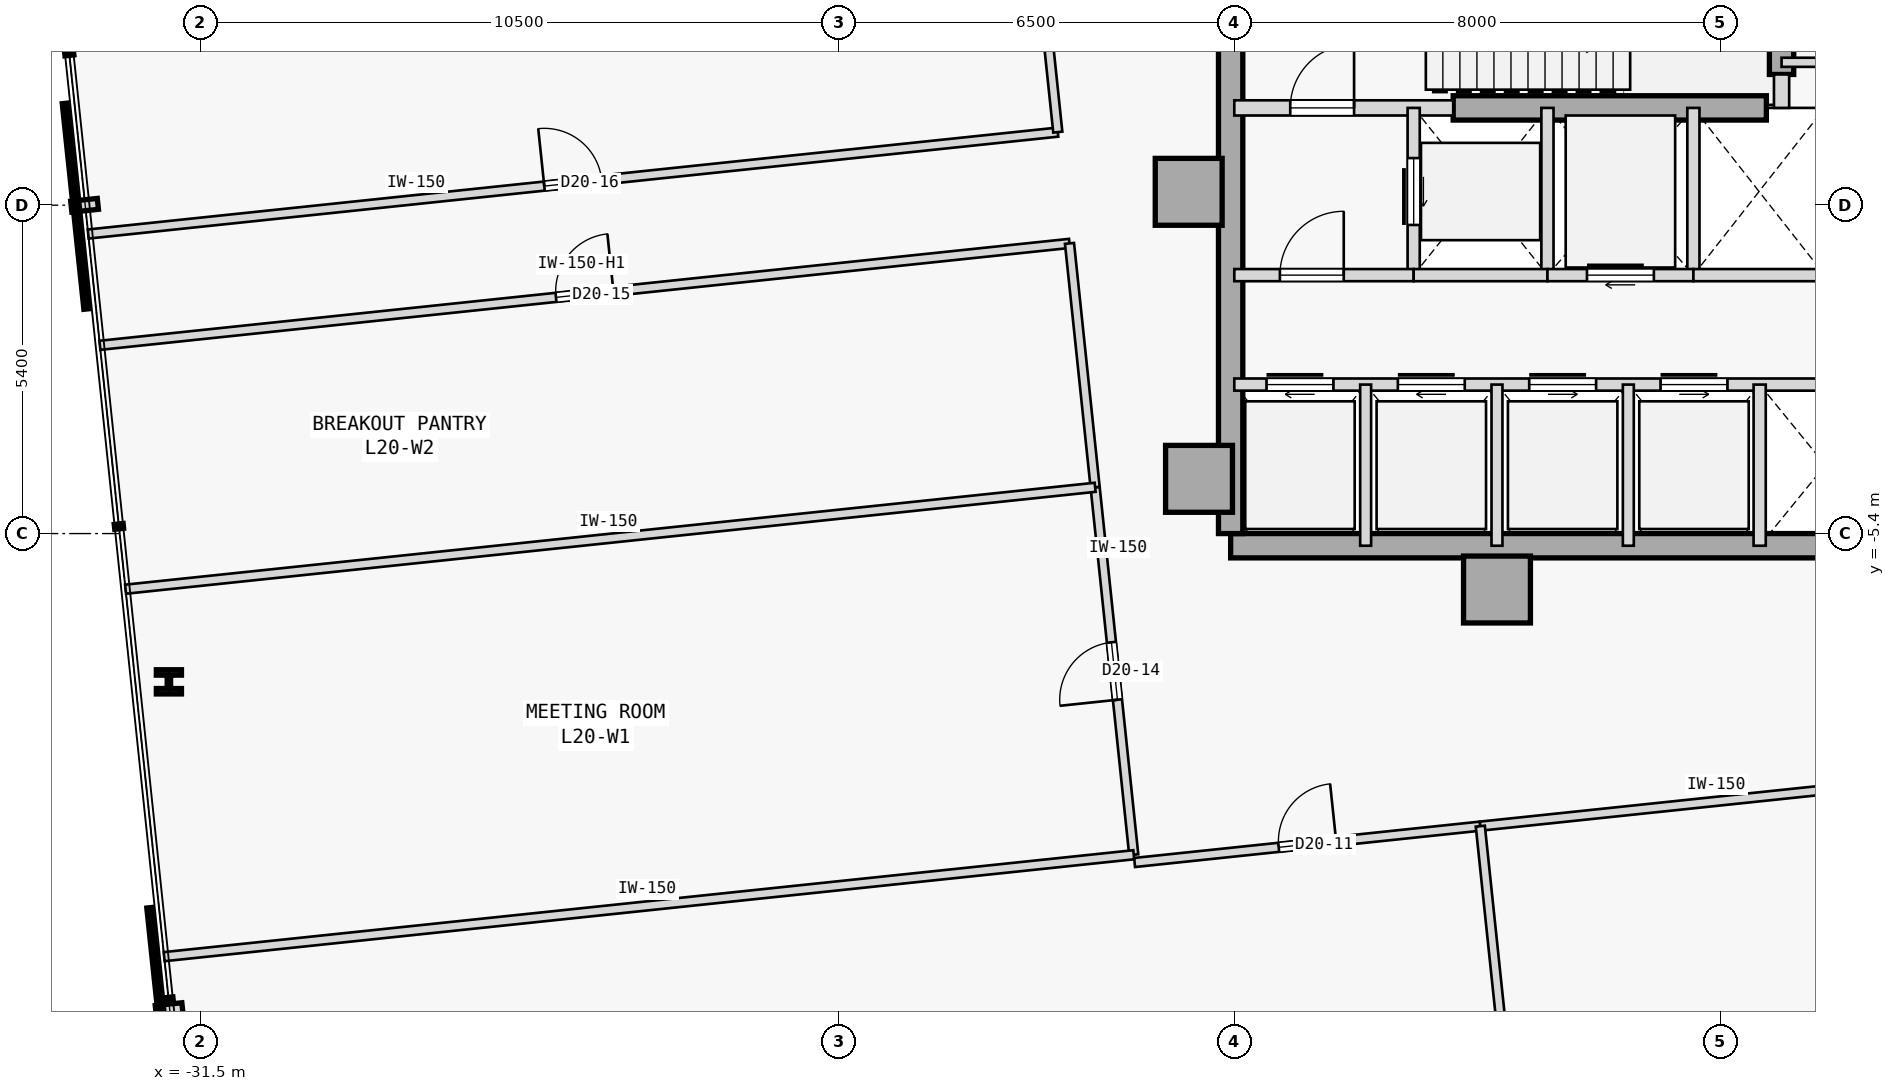
"""IFC4 building model, lengths in metres.
Left out: names, types, materials, properties, quantities, classifications, styles, units other than length and angle.
Written with IfcOpenShell. Run it as: python <this file> out.ifc"""

import sys

from ifc_helpers import new_model, si_unit, direction, frame, frame_2d, origin, origin_2d, place, context, subcontext, project, spatial, rectangle, i_section, extrude, element, fill, save


model = new_model("IFC4")
c1 = context("Model", 3, precision=1e-05, world=origin(), true_north=direction((0.0, 1.0)))
c2 = subcontext(c1, "Body", "Model", "MODEL_VIEW")
j1 = project(units=[si_unit("LENGTHUNIT", "METRE"), si_unit("PLANEANGLEUNIT", "RADIAN")], contexts=[c1])
p1 = place(None, origin())
s1 = spatial("IfcSite", under=j1, at=p1, CompositionType="ELEMENT")
p2 = place(p1, origin())
s2 = spatial("IfcBuilding", under=s1, at=p2, CompositionType="ELEMENT")
p3 = place(p2, frame((0.0, 0.0, 83.2)))
s3 = spatial("IfcBuildingStorey", under=s2, at=p3, CompositionType="ELEMENT", Elevation=83.2)
for number, where, z_axis, x_axis in (
    (1, (-15.25, 0.22, 0.0), (0.0, 0.0, 1.0), (1.0, 0.0, 0.0)),
    (2, (-15.08, -4.5, 0.0), (0.0, 0.0, 1.0), (1.0, 0.0, 0.0)),
    (3, (-10.18, -6.32, 0.0), (0.0, 0.0, 1.0), (1.0, 0.0, 0.0)),
):
    element("IfcColumn", number, at=place(p3, frame(where, z_axis=z_axis, x_axis=x_axis)), inside=s3, PredefinedType="COLUMN", context=c2, shape_type="SweptSolid", body=[
        extrude(rectangle(XDim=1.1, YDim=1.1, at=origin_2d()), origin(), (0.0, 0.0, 1.0), 4.2),
    ])
p4 = place(p3, frame((-14.56, -5.6, 0.0), z_axis=(0.0, 0.0, 1.0), x_axis=(1.0, 0.0, 0.0)))
e4 = element("IfcWall", 4, at=p4, inside=s3, PredefinedType="SHEAR", context=c2, shape_type="SweptSolid", body=[
    extrude(rectangle(XDim=10.86, YDim=0.4, at=frame_2d((5.43, 0.0))), origin(), (0.0, 0.0, 1.0), 3.975),
])
p5 = place(p3, frame((-14.56, -5.4, 0.0), z_axis=(0.0, 0.0, 1.0), x_axis=(0.0, 1.0, 0.0)))
e5 = element("IfcWall", 5, at=p5, inside=s3, PredefinedType="SHEAR", context=c2, shape_type="SweptSolid", body=[
    extrude(rectangle(XDim=10.8, YDim=0.4, at=frame_2d((5.4, 0.0))), origin(), (0.0, 0.0, 1.0), 3.975),
])
p6 = place(p3, frame((-5.5, 2.15, 0.0), z_axis=(0.0, 0.0, 1.0), x_axis=(0.0, 1.0, 0.0)))
e6 = element("IfcWall", 6, at=p6, inside=s3, PredefinedType="SHEAR", context=c2, shape_type="SweptSolid", body=[
    extrude(rectangle(XDim=3.25, YDim=0.4, at=frame_2d((1.625, 0.0))), origin(), (0.0, 0.0, 1.0), 3.975),
])
p7 = place(p3, frame((-10.9, 1.6, 0.0), z_axis=(0.0, 0.0, 1.0), x_axis=(1.0, 0.0, 0.0)))
e7 = element("IfcWall", 7, at=p7, inside=s3, PredefinedType="SHEAR", context=c2, shape_type="SweptSolid", body=[
    extrude(rectangle(XDim=5.15, YDim=0.4, at=frame_2d((2.575, 0.0))), origin(), (0.0, 0.0, 1.0), 3.975),
])
p8 = place(p3, frame((-32.021, -7.838, 0.0), z_axis=(0.0, 0.0, 1.0), x_axis=(1.0, 0.0, 0.0)))
e8 = element("IfcColumn", 8, at=p8, inside=s3, PredefinedType="COLUMN", context=c2, shape_type="SweptSolid", body=[
    extrude(i_section(OverallWidth=0.413, OverallDepth=0.398, WebThickness=0.056, FlangeThickness=0.089, FilletRadius=0.015, at=origin_2d()), origin(), (0.0, 0.0, 1.0), 4.2),
])
p9 = place(p3, frame((-14.5, 1.6, 0.0), z_axis=(0.0, 0.0, 1.0), x_axis=(1.0, 0.0, 0.0)))
e9 = element("IfcWall", 9, at=p9, inside=s3, PredefinedType="STANDARD", context=c2, shape_type="SweptSolid", body=[
    extrude(rectangle(XDim=3.6, YDim=0.25, at=frame_2d((1.8, 0.0))), origin(), (0.0, 0.0, 1.0), 3.975),
])
p10 = place(p9, frame((0.92, 0.0, 0.0)))
e10 = element("IfcOpeningElement", 10, at=p10, cuts=e9, PredefinedType="OPENING", context=c2, shape_type="SweptSolid", body=[
    extrude(rectangle(XDim=1.05, YDim=2.15, at=frame_2d((0.525, 1.075))), frame((0.0, 0.135, 0.0), z_axis=(0.0, -1.0, 0.0), x_axis=(1.0, 0.0, 0.0)), (0.0, 0.0, 1.0), 0.27),
])
p11 = place(p3, frame((-5.5, 1.6, 0.0), z_axis=(0.0, 0.0, 1.0), x_axis=(0.0, 1.0, 0.0)))
e11 = element("IfcWall", 11, at=p11, inside=s3, PredefinedType="STANDARD", context=c2, shape_type="SweptSolid", body=[
    extrude(rectangle(XDim=0.55, YDim=0.25, at=frame_2d((0.275, 0.0))), origin(), (0.0, 0.0, 1.0), 3.975),
])
p12 = place(p3, frame((-11.55, -1.15, 0.0), z_axis=(0.0, 0.0, 1.0), x_axis=(0.0, 1.0, 0.0)))
e12 = element("IfcWall", 12, at=p12, inside=s3, PredefinedType="STANDARD", context=c2, shape_type="SweptSolid", body=[
    extrude(rectangle(XDim=2.75, YDim=0.2, at=frame_2d((1.375, 0.0))), origin(), (0.0, 0.0, 1.0), 3.975),
])
p13 = place(p12, frame((0.825, 0.0, 0.0)))
e13 = element("IfcOpeningElement", 13, at=p13, cuts=e12, PredefinedType="OPENING", context=c2, shape_type="SweptSolid", body=[
    extrude(rectangle(XDim=1.1, YDim=2.15, at=frame_2d((0.55, 1.075))), frame((0.0, 0.11, 0.0), z_axis=(0.0, -1.0, 0.0), x_axis=(1.0, 0.0, 0.0)), (0.0, 0.0, 1.0), 0.22),
])
p14 = place(p3, frame((-9.35, -1.15, 0.0), z_axis=(0.0, 0.0, 1.0), x_axis=(0.0, 1.0, 0.0)))
e14 = element("IfcWall", 14, at=p14, inside=s3, PredefinedType="STANDARD", context=c2, shape_type="SweptSolid", body=[
    extrude(rectangle(XDim=2.75, YDim=0.2, at=frame_2d((1.375, 0.0))), origin(), (0.0, 0.0, 1.0), 3.975),
])
p15 = place(p3, frame((-14.5, -1.15, 0.0), z_axis=(0.0, 0.0, 1.0), x_axis=(1.0, 0.0, 0.0)))
e15 = element("IfcWall", 15, at=p15, inside=s3, PredefinedType="STANDARD", context=c2, shape_type="SweptSolid", body=[
    extrude(rectangle(XDim=2.95, YDim=0.2, at=frame_2d((1.475, 0.0))), origin(), (0.0, 0.0, 1.0), 3.975),
])
p16 = place(p15, frame((0.75, 0.0, 0.0)))
e16 = element("IfcOpeningElement", 16, at=p16, cuts=e15, PredefinedType="OPENING", context=c2, shape_type="SweptSolid", body=[
    extrude(rectangle(XDim=1.05, YDim=2.18, at=frame_2d((0.525, 1.09))), frame((0.0, 0.11, 0.0), z_axis=(0.0, -1.0, 0.0), x_axis=(1.0, 0.0, 0.0)), (0.0, 0.0, 1.0), 0.22),
])
p17 = place(p3, frame((-11.55, -1.15, 0.0), z_axis=(0.0, 0.0, 1.0), x_axis=(1.0, 0.0, 0.0)))
e17 = element("IfcWall", 17, at=p17, inside=s3, PredefinedType="STANDARD", context=c2, shape_type="SweptSolid", body=[
    extrude(rectangle(XDim=2.2, YDim=0.2, at=frame_2d((1.1, 0.0))), origin(), (0.0, 0.0, 1.0), 3.975),
])
p18 = place(p3, frame((-6.95, -1.15, 0.0), z_axis=(0.0, 0.0, 1.0), x_axis=(0.0, 1.0, 0.0)))
e18 = element("IfcWall", 18, at=p18, inside=s3, PredefinedType="STANDARD", context=c2, shape_type="SweptSolid", body=[
    extrude(rectangle(XDim=2.75, YDim=0.2, at=frame_2d((1.375, 0.0))), origin(), (0.0, 0.0, 1.0), 3.975),
])
p19 = place(p3, frame((-9.35, -1.15, 0.0), z_axis=(0.0, 0.0, 1.0), x_axis=(1.0, 0.0, 0.0)))
e19 = element("IfcWall", 19, at=p19, inside=s3, PredefinedType="STANDARD", context=c2, shape_type="SweptSolid", body=[
    extrude(rectangle(XDim=2.4, YDim=0.2, at=frame_2d((1.2, 0.0))), origin(), (0.0, 0.0, 1.0), 3.975),
])
p20 = place(p19, frame((0.65, 0.0, 0.0)))
e20 = element("IfcOpeningElement", 20, at=p20, cuts=e19, PredefinedType="OPENING", context=c2, shape_type="SweptSolid", body=[
    extrude(rectangle(XDim=1.1, YDim=2.15, at=frame_2d((0.55, 1.075))), frame((0.0, 0.11, 0.0), z_axis=(0.0, -1.0, 0.0), x_axis=(1.0, 0.0, 0.0)), (0.0, 0.0, 1.0), 0.22),
])
p21 = place(p3, frame((-6.95, -1.15, 0.0), z_axis=(0.0, 0.0, 1.0), x_axis=(1.0, 0.0, 0.0)))
e21 = element("IfcWall", 21, at=p21, inside=s3, PredefinedType="STANDARD", context=c2, shape_type="SweptSolid", body=[
    extrude(rectangle(XDim=2.16, YDim=0.2, at=frame_2d((1.08, 0.0))), origin(), (0.0, 0.0, 1.0), 3.975),
])
p22 = place(p3, frame((-14.5, -2.95, 0.0), z_axis=(0.0, 0.0, 1.0), x_axis=(1.0, 0.0, 0.0)))
e22 = element("IfcWall", 22, at=p22, inside=s3, PredefinedType="STANDARD", context=c2, shape_type="SweptSolid", body=[
    extrude(rectangle(XDim=10.8, YDim=0.2, at=frame_2d((5.4, 0.0))), origin(), (0.0, 0.0, 1.0), 3.975),
])
p23 = place(p22, frame((0.53, 0.0, 0.0)))
e23 = element("IfcOpeningElement", 23, at=p23, cuts=e22, PredefinedType="OPENING", context=c2, shape_type="SweptSolid", body=[
    extrude(rectangle(XDim=1.1, YDim=2.15, at=frame_2d((0.55, 1.075))), frame((0.0, 0.11, 0.0), z_axis=(0.0, -1.0, 0.0), x_axis=(1.0, 0.0, 0.0)), (0.0, 0.0, 1.0), 0.22),
])
p24 = place(p22, frame((2.69, 0.0, 0.0)))
e24 = element("IfcOpeningElement", 24, at=p24, cuts=e22, PredefinedType="OPENING", context=c2, shape_type="SweptSolid", body=[
    extrude(rectangle(XDim=1.1, YDim=2.15, at=frame_2d((0.55, 1.075))), frame((0.0, 0.11, 0.0), z_axis=(0.0, -1.0, 0.0), x_axis=(1.0, 0.0, 0.0)), (0.0, 0.0, 1.0), 0.22),
])
p25 = place(p22, frame((4.85, 0.0, 0.0)))
e25 = element("IfcOpeningElement", 25, at=p25, cuts=e22, PredefinedType="OPENING", context=c2, shape_type="SweptSolid", body=[
    extrude(rectangle(XDim=1.1, YDim=2.15, at=frame_2d((0.55, 1.075))), frame((0.0, 0.11, 0.0), z_axis=(0.0, -1.0, 0.0), x_axis=(1.0, 0.0, 0.0)), (0.0, 0.0, 1.0), 0.22),
])
p26 = place(p22, frame((7.01, 0.0, 0.0)))
e26 = element("IfcOpeningElement", 26, at=p26, cuts=e22, PredefinedType="OPENING", context=c2, shape_type="SweptSolid", body=[
    extrude(rectangle(XDim=1.1, YDim=2.15, at=frame_2d((0.55, 1.075))), frame((0.0, 0.11, 0.0), z_axis=(0.0, -1.0, 0.0), x_axis=(1.0, 0.0, 0.0)), (0.0, 0.0, 1.0), 0.22),
])
p27 = place(p3, frame((-5.86, -5.6, 0.0), z_axis=(0.0, 0.0, 1.0), x_axis=(0.0, 1.0, 0.0)))
e27 = element("IfcWall", 27, at=p27, inside=s3, PredefinedType="STANDARD", context=c2, shape_type="SweptSolid", body=[
    extrude(rectangle(XDim=2.65, YDim=0.2, at=frame_2d((1.325, 0.0))), origin(), (0.0, 0.0, 1.0), 3.975),
])
for number, where, z_axis, x_axis in (
    (28, (-12.34, -5.6, 0.0), (0.0, 0.0, 1.0), (0.0, 1.0, 0.0)),
    (29, (-10.18, -5.6, 0.0), (0.0, 0.0, 1.0), (0.0, 1.0, 0.0)),
    (30, (-8.02, -5.6, 0.0), (0.0, 0.0, 1.0), (0.0, 1.0, 0.0)),
):
    element("IfcWall", number, at=place(p3, frame(where, z_axis=z_axis, x_axis=x_axis)), inside=s3, PredefinedType="STANDARD", context=c2, shape_type="SweptSolid", body=[
        extrude(rectangle(XDim=2.65, YDim=0.18, at=frame_2d((1.325, 0.0))), origin(), (0.0, 0.0, 1.0), 3.975),
    ])
p28 = place(p3, frame((-5.5, 2.35, 0.0), z_axis=(0.0, 0.0, 1.0), x_axis=(1.0, 0.0, 0.0)))
e31 = element("IfcWall", 31, at=p28, inside=s3, PredefinedType="PARTITIONING", context=c2, shape_type="SweptSolid", body=[
    extrude(rectangle(XDim=1.8, YDim=0.15, at=frame_2d((0.9, 0.0))), origin(), (0.0, 0.0, 1.0), 3.975),
])
p29 = place(p3, frame((-16.14, -10.809, 0.0), z_axis=(0.0, 0.0, 1.0), x_axis=(0.994520418841, 0.104542510534, 0.0)))
e32 = element("IfcWall", 32, at=p29, inside=s3, PredefinedType="PARTITIONING", context=c2, shape_type="SweptSolid", body=[
    extrude(rectangle(XDim=5.717, YDim=0.15, at=frame_2d((2.858, 0.0))), origin(), (0.0, 0.0, 1.0), 3.975),
])
p30 = place(p29, frame((2.384, 0.0, 0.0)))
e33 = element("IfcOpeningElement", 33, at=p30, cuts=e32, PredefinedType="OPENING", context=c2, shape_type="SweptSolid", body=[
    extrude(rectangle(XDim=0.95, YDim=2.15, at=frame_2d((0.475, 1.075))), frame((0.0, 0.085, 0.0), z_axis=(0.0, -1.0, 0.0), x_axis=(1.0, 0.0, 0.0)), (0.0, 0.0, 1.0), 0.17),
])
p31 = place(p3, frame((-10.454, -10.211, 0.0), z_axis=(0.0, 0.0, 1.0), x_axis=(0.9945223835, 0.104523818899, 0.0)))
e34 = element("IfcWall", 34, at=p31, inside=s3, PredefinedType="PARTITIONING", context=c2, shape_type="SweptSolid", body=[
    extrude(rectangle(XDim=13.58, YDim=0.15, at=frame_2d((6.79, 0.0))), origin(), (0.0, 0.0, 1.0), 3.975),
])
p32 = place(p31, frame((6.315, 0.0, 0.0)))
e35 = element("IfcOpeningElement", 35, at=p32, cuts=e34, PredefinedType="OPENING", context=c2, shape_type="SweptSolid", body=[
    extrude(rectangle(XDim=0.95, YDim=2.15, at=frame_2d((0.475, 1.075))), frame((0.0, 0.085, 0.0), z_axis=(0.0, -1.0, 0.0), x_axis=(1.0, 0.0, 0.0)), (0.0, 0.0, 1.0), 0.17),
])
p33 = place(p3, frame((-16.153, -10.682, 0.0), z_axis=(0.0, 0.0, 1.0), x_axis=(-0.104550920346, 0.994519534778, 0.0)))
e36 = element("IfcWall", 36, at=p33, inside=s3, PredefinedType="PARTITIONING", context=c2, shape_type="SweptSolid", body=[
    extrude(rectangle(XDim=6.076, YDim=0.15, at=frame_2d((3.038, 0.0))), origin(), (0.0, 0.0, 1.0), 3.975),
])
p34 = place(p33, frame((2.563, 0.0, 0.0)))
e37 = element("IfcOpeningElement", 37, at=p34, cuts=e36, PredefinedType="OPENING", context=c2, shape_type="SweptSolid", body=[
    extrude(rectangle(XDim=0.95, YDim=2.15, at=frame_2d((0.475, 1.075))), frame((0.0, 0.085, 0.0), z_axis=(0.0, -1.0, 0.0), x_axis=(1.0, 0.0, 0.0)), (0.0, 0.0, 1.0), 0.17),
])
p35 = place(p3, frame((-33.155, -2.304, 0.0), z_axis=(0.0, 0.0, 1.0), x_axis=(0.994521044813, 0.104536555445, 0.0)))
e38 = element("IfcWall", 38, at=p35, inside=s3, PredefinedType="PARTITIONING", context=c2, shape_type="SweptSolid", body=[
    extrude(rectangle(XDim=16.033, YDim=0.15, at=frame_2d((8.017, 0.0))), origin(), (0.0, 0.0, 1.0), 3.525),
])
p36 = place(p35, frame((7.542, 0.0, 0.0)))
e39 = element("IfcOpeningElement", 39, at=p36, cuts=e38, PredefinedType="OPENING", context=c2, shape_type="SweptSolid", body=[
    extrude(rectangle(XDim=0.95, YDim=2.15, at=frame_2d((0.475, 1.075))), frame((0.0, 0.085, 0.0), z_axis=(0.0, -1.0, 0.0), x_axis=(1.0, 0.0, 0.0)), (0.0, 0.0, 1.0), 0.17),
])
p37 = place(p3, frame((-16.789, -4.639, 0.0), z_axis=(0.0, 0.0, 1.0), x_axis=(-0.104542983594, 0.994520369113, 0.0)))
e40 = element("IfcWall", 40, at=p37, inside=s3, PredefinedType="PARTITIONING", context=c2, shape_type="SweptSolid", body=[
    extrude(rectangle(XDim=4.033, YDim=0.15, at=frame_2d((2.017, 0.0))), origin(), (0.0, 0.0, 1.0), 3.975),
])
p38 = place(p3, frame((-33.348, -0.474, 0.0), z_axis=(0.0, 0.0, 1.0), x_axis=(0.994522794159, 0.104519911488, 0.0)))
e41 = element("IfcWall", 41, at=p38, inside=s3, PredefinedType="PARTITIONING", context=c2, shape_type="SweptSolid", body=[
    extrude(rectangle(XDim=16.033, YDim=0.15, at=frame_2d((8.017, 0.0))), origin(), (0.0, 0.0, 1.0), 3.975),
])
p39 = place(p38, frame((7.542, 0.0, 0.0)))
e42 = element("IfcOpeningElement", 42, at=p39, cuts=e41, PredefinedType="OPENING", context=c2, shape_type="SweptSolid", body=[
    extrude(rectangle(XDim=0.95, YDim=2.15, at=frame_2d((0.475, 1.075))), frame((0.0, 0.085, 0.0), z_axis=(0.0, -1.0, 0.0), x_axis=(1.0, 0.0, 0.0)), (0.0, 0.0, 1.0), 0.17),
])
p40 = place(p3, frame((-17.402, 1.202, 0.0), z_axis=(0.0, 0.0, 1.0), x_axis=(-0.104523807841, 0.994522384662, 0.0)))
e43 = element("IfcWall", 43, at=p40, inside=s3, PredefinedType="PARTITIONING", context=c2, shape_type="SweptSolid", body=[
    extrude(rectangle(XDim=5.921, YDim=0.15, at=frame_2d((2.96, 0.0))), origin(), (0.0, 0.0, 1.0), 3.975),
])
p41 = place(p3, frame((-9.19, -22.238, 0.0), z_axis=(0.0, 0.0, 1.0), x_axis=(-0.104535555083, 0.994521149963, 0.0)))
e44 = element("IfcWall", 44, at=p41, inside=s3, PredefinedType="PARTITIONING", context=c2, shape_type="SweptSolid", body=[
    extrude(rectangle(XDim=12.093, YDim=0.15, at=frame_2d((6.046, 0.0))), origin(), (0.0, 0.0, 1.0), 3.525),
])
p42 = place(p3, frame((-32.099, -12.358, 0.0), z_axis=(0.0, 0.0, 1.0), x_axis=(0.994522794159, 0.104519911488, 0.0)))
e45 = element("IfcWall", 45, at=p42, inside=s3, PredefinedType="PARTITIONING", context=c2, shape_type="SweptSolid", body=[
    extrude(rectangle(XDim=16.033, YDim=0.15, at=frame_2d((8.017, 0.0))), origin(), (0.0, 0.0, 1.0), 3.975),
])
p43 = place(p3, frame((-32.734, -6.315, 0.0), z_axis=(0.0, 0.0, 1.0), x_axis=(0.994522627807, 0.104521494347, 0.0)))
e46 = element("IfcWall", 46, at=p43, inside=s3, PredefinedType="PARTITIONING", context=c2, shape_type="SweptSolid", body=[
    extrude(rectangle(XDim=16.033, YDim=0.15, at=frame_2d((8.017, 0.0))), origin(), (0.0, 0.0, 1.0), 3.975),
])
p44 = place(p10, origin())
e47 = element("IfcDoor", 47, at=p44, inside=s3, OperationType="SINGLE_SWING_RIGHT", PredefinedType="DOOR", context=c2, shape_type="SweptSolid", body=[
    extrude(rectangle(XDim=1.05, YDim=2.15, at=frame_2d((0.525, 1.075))), frame((0.0, 0.025, 0.0), z_axis=(0.0, -1.0, 0.0), x_axis=(1.0, 0.0, 0.0)), (0.0, 0.0, 1.0), 0.05),
])
fill(e10, e47)
p45 = place(p16, origin())
e48 = element("IfcDoor", 48, at=p45, inside=s3, OperationType="SINGLE_SWING_RIGHT", PredefinedType="DOOR", context=c2, shape_type="SweptSolid", body=[
    extrude(rectangle(XDim=1.05, YDim=2.18, at=frame_2d((0.525, 1.09))), frame((0.0, 0.025, 0.0), z_axis=(0.0, -1.0, 0.0), x_axis=(1.0, 0.0, 0.0)), (0.0, 0.0, 1.0), 0.05),
])
fill(e16, e48)
p46 = place(p13, origin())
e49 = element("IfcDoor", 49, at=p46, inside=s3, OperationType="SLIDING_TO_RIGHT", PredefinedType="DOOR", context=c2, shape_type="SweptSolid", body=[
    extrude(rectangle(XDim=1.1, YDim=2.15, at=frame_2d((0.55, 1.075))), frame((0.0, 0.025, 0.0), z_axis=(0.0, -1.0, 0.0), x_axis=(1.0, 0.0, 0.0)), (0.0, 0.0, 1.0), 0.05),
])
fill(e13, e49)
p47 = place(p20, origin())
e50 = element("IfcDoor", 50, at=p47, inside=s3, OperationType="SLIDING_TO_RIGHT", PredefinedType="DOOR", context=c2, shape_type="SweptSolid", body=[
    extrude(rectangle(XDim=1.1, YDim=2.15, at=frame_2d((0.55, 1.075))), frame((0.0, 0.025, 0.0), z_axis=(0.0, -1.0, 0.0), x_axis=(1.0, 0.0, 0.0)), (0.0, 0.0, 1.0), 0.05),
])
fill(e20, e50)
p48 = place(p23, origin())
e51 = element("IfcDoor", 51, at=p48, inside=s3, OperationType="SLIDING_TO_RIGHT", PredefinedType="DOOR", context=c2, shape_type="SweptSolid", body=[
    extrude(rectangle(XDim=1.1, YDim=2.15, at=frame_2d((0.55, 1.075))), frame((0.0, 0.025, 0.0), z_axis=(0.0, -1.0, 0.0), x_axis=(1.0, 0.0, 0.0)), (0.0, 0.0, 1.0), 0.05),
])
fill(e23, e51)
p49 = place(p24, origin())
e52 = element("IfcDoor", 52, at=p49, inside=s3, OperationType="SLIDING_TO_RIGHT", PredefinedType="DOOR", context=c2, shape_type="SweptSolid", body=[
    extrude(rectangle(XDim=1.1, YDim=2.15, at=frame_2d((0.55, 1.075))), frame((0.0, 0.025, 0.0), z_axis=(0.0, -1.0, 0.0), x_axis=(1.0, 0.0, 0.0)), (0.0, 0.0, 1.0), 0.05),
])
fill(e24, e52)
p50 = place(p25, origin())
e53 = element("IfcDoor", 53, at=p50, inside=s3, OperationType="SLIDING_TO_LEFT", PredefinedType="DOOR", context=c2, shape_type="SweptSolid", body=[
    extrude(rectangle(XDim=1.1, YDim=2.15, at=frame_2d((0.55, 1.075))), frame((0.0, 0.025, 0.0), z_axis=(0.0, -1.0, 0.0), x_axis=(1.0, 0.0, 0.0)), (0.0, 0.0, 1.0), 0.05),
])
fill(e25, e53)
p51 = place(p26, origin())
e54 = element("IfcDoor", 54, at=p51, inside=s3, OperationType="SLIDING_TO_LEFT", PredefinedType="DOOR", context=c2, shape_type="SweptSolid", body=[
    extrude(rectangle(XDim=1.1, YDim=2.15, at=frame_2d((0.55, 1.075))), frame((0.0, 0.025, 0.0), z_axis=(0.0, -1.0, 0.0), x_axis=(1.0, 0.0, 0.0)), (0.0, 0.0, 1.0), 0.05),
])
fill(e26, e54)
p52 = place(p30, origin())
e55 = element("IfcDoor", 55, at=p52, inside=s3, OperationType="SINGLE_SWING_RIGHT", PredefinedType="DOOR", context=c2, shape_type="SweptSolid", body=[
    extrude(rectangle(XDim=0.95, YDim=2.15, at=frame_2d((0.475, 1.075))), frame((0.0, 0.025, 0.0), z_axis=(0.0, -1.0, 0.0), x_axis=(1.0, 0.0, 0.0)), (0.0, 0.0, 1.0), 0.05),
])
fill(e33, e55)
p53 = place(p34, origin())
e56 = element("IfcDoor", 56, at=p53, inside=s3, OperationType="SINGLE_SWING_LEFT", PredefinedType="DOOR", context=c2, shape_type="SweptSolid", body=[
    extrude(rectangle(XDim=0.95, YDim=2.15, at=frame_2d((0.475, 1.075))), frame((0.0, 0.025, 0.0), z_axis=(0.0, -1.0, 0.0), x_axis=(1.0, 0.0, 0.0)), (0.0, 0.0, 1.0), 0.05),
])
fill(e37, e56)
p54 = place(p36, origin())
e57 = element("IfcDoor", 57, at=p54, inside=s3, OperationType="SINGLE_SWING_RIGHT", PredefinedType="DOOR", context=c2, shape_type="SweptSolid", body=[
    extrude(rectangle(XDim=0.95, YDim=2.15, at=frame_2d((0.475, 1.075))), frame((0.0, 0.025, 0.0), z_axis=(0.0, -1.0, 0.0), x_axis=(1.0, 0.0, 0.0)), (0.0, 0.0, 1.0), 0.05),
])
fill(e39, e57)
p55 = place(p39, origin())
e58 = element("IfcDoor", 58, at=p55, inside=s3, OperationType="SINGLE_SWING_LEFT", PredefinedType="DOOR", context=c2, shape_type="SweptSolid", body=[
    extrude(rectangle(XDim=0.95, YDim=2.15, at=frame_2d((0.475, 1.075))), frame((0.0, 0.025, 0.0), z_axis=(0.0, -1.0, 0.0), x_axis=(1.0, 0.0, 0.0)), (0.0, 0.0, 1.0), 0.05),
])
fill(e42, e58)
save(model, sys.argv[1])
